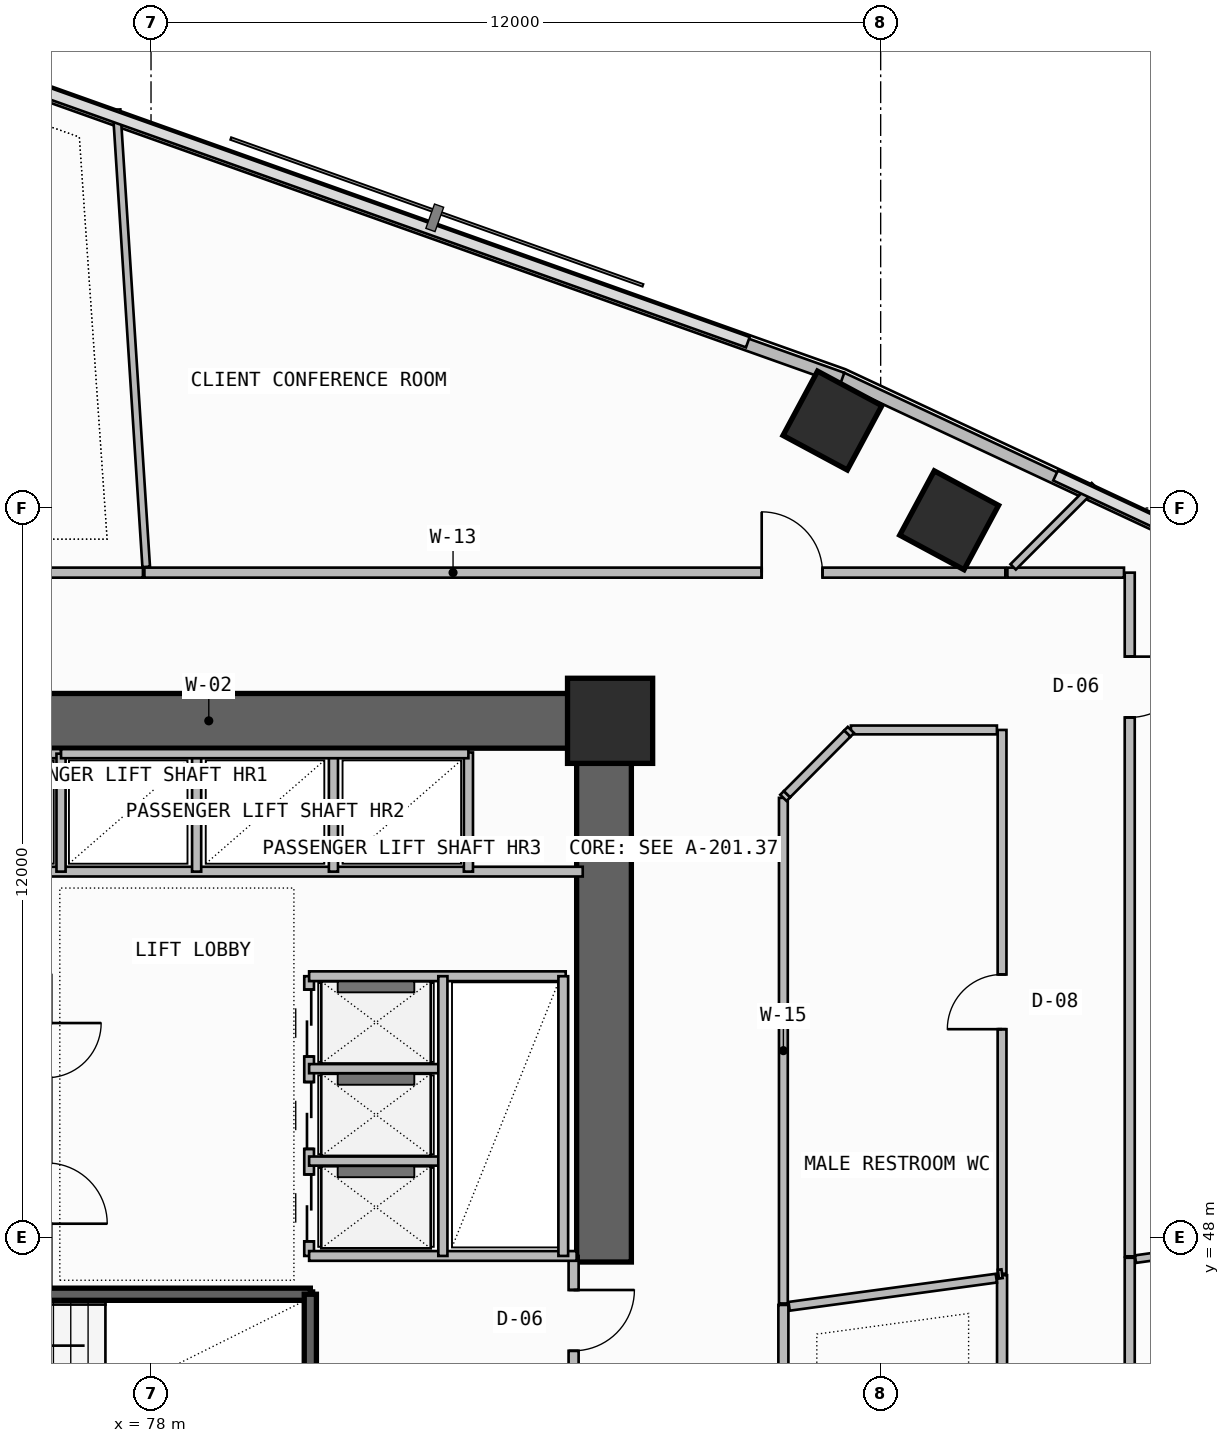
"""IFC4 building model, lengths in metres.
Left out: names, types, materials, properties, quantities, classifications, styles, units other than length and angle.
Written with IfcOpenShell. Run it as: python <this file> out.ifc"""

import sys

from ifc_helpers import new_model, si_unit, direction, frame, frame_2d, origin, origin_2d, place, context, subcontext, project, spatial, rectangle, extrude, element, fill, save


model = new_model("IFC4")
c1 = context("Model", 3, precision=1e-05, world=origin(), true_north=direction((0.0, 1.0)))
c2 = subcontext(c1, "Body", "Model", "MODEL_VIEW")
j1 = project(units=[si_unit("LENGTHUNIT", "METRE"), si_unit("PLANEANGLEUNIT", "RADIAN")], contexts=[c1])
p1 = place(None, origin())
s1 = spatial("IfcSite", under=j1, at=p1, CompositionType="ELEMENT")
p2 = place(p1, origin())
s2 = spatial("IfcBuilding", under=s1, at=p2, CompositionType="ELEMENT")
p3 = place(p2, frame((0.0, 0.0, 132.3)))
s3 = spatial("IfcBuildingStorey", under=s2, at=p3, CompositionType="ELEMENT", Elevation=132.3)
p4 = place(p3, frame((72.0, 56.5, -0.4), z_axis=(0.0, 0.0, 1.0), x_axis=(1.0, 0.0, 0.0)))
e1 = element("IfcWall", 1, at=p4, inside=s3, PredefinedType="SHEAR", context=c2, shape_type="SweptSolid", body=[
    extrude(rectangle(XDim=13.9, YDim=0.9, at=frame_2d((6.95, 0.0))), origin(), (0.0, 0.0, 1.0), 3.74),
])
p5 = place(p3, frame((85.45, 47.6, -0.4), z_axis=(0.0, 0.0, 1.0), x_axis=(0.0, 1.0, 0.0)))
e2 = element("IfcWall", 2, at=p5, inside=s3, PredefinedType="SHEAR", context=c2, shape_type="SweptSolid", body=[
    extrude(rectangle(XDim=8.45, YDim=0.9, at=frame_2d((4.225, 0.0))), origin(), (0.0, 0.0, 1.0), 3.74),
])
p6 = place(p3, frame((85.55, 56.5, 0.0), z_axis=(0.0, 0.0, 1.0), x_axis=(1.0, 0.0, 0.0)))
e3 = element("IfcColumn", 3, at=p6, inside=s3, PredefinedType="COLUMN", context=c2, shape_type="SweptSolid", body=[
    extrude(rectangle(XDim=1.4, YDim=1.4, at=origin_2d()), origin(), (0.0, 0.0, 1.0), 3.6),
])
p7 = place(p3, frame((91.126, 59.798, -0.4), z_axis=(0.0, 0.0, 1.0), x_axis=(0.473319667185, 0.880890738205, 0.0)))
e4 = element("IfcColumn", 4, at=p7, inside=s3, PredefinedType="COLUMN", context=c2, shape_type="SweptSolid", body=[
    extrude(rectangle(XDim=1.2, YDim=1.2, at=origin_2d()), origin(), (0.0, 0.0, 1.0), 4.0),
])
p8 = place(p3, frame((89.207, 61.438, 0.0), z_axis=(0.0, 0.0, 1.0), x_axis=(0.473319667185, 0.880890738205, 0.0)))
e5 = element("IfcColumn", 5, at=p8, inside=s3, PredefinedType="COLUMN", context=c2, shape_type="SweptSolid", body=[
    extrude(rectangle(XDim=1.2, YDim=1.2, at=origin_2d()), origin(), (0.0, 0.0, 1.0), 3.6),
])
p9 = place(p3, frame((119.926, 47.843, 0.0), z_axis=(0.0, 0.0, 1.0), x_axis=(-0.905880730846, 0.423532881228, 0.0)))
e6 = element("IfcWall", 6, at=p9, inside=s3, PredefinedType="PARAPET", context=c2, shape_type="SweptSolid", body=[
    extrude(rectangle(XDim=33.748, YDim=0.2, at=frame_2d((16.874, 0.0))), origin(), (0.0, 0.0, 1.0), 1.15),
])
p10 = place(p3, frame((89.368, 62.13, 0.0), z_axis=(0.0, 0.0, 1.0), x_axis=(-0.942033439765, 0.335518998515, 0.0)))
e7 = element("IfcWall", 7, at=p10, inside=s3, PredefinedType="PARAPET", context=c2, shape_type="SweptSolid", body=[
    extrude(rectangle(XDim=27.969, YDim=0.2, at=frame_2d((13.985, 0.0))), origin(), (0.0, 0.0, 1.0), 1.15),
])
p11 = place(p3, frame((72.92, 47.07, -0.4), z_axis=(0.0, 0.0, 1.0), x_axis=(1.0, 0.0, 0.0)))
e8 = element("IfcWall", 8, at=p11, inside=s3, PredefinedType="SOLIDWALL", context=c2, shape_type="SweptSolid", body=[
    extrude(rectangle(XDim=7.7, YDim=0.2, at=frame_2d((3.85, 0.0))), origin(), (0.0, 0.0, 1.0), 3.74),
])
p12 = place(p3, frame((80.62, 43.83, -0.4), z_axis=(0.0, 0.0, 1.0), x_axis=(0.0, 1.0, 0.0)))
e9 = element("IfcWall", 9, at=p12, inside=s3, PredefinedType="SOLIDWALL", context=c2, shape_type="SweptSolid", body=[
    extrude(rectangle(XDim=3.24, YDim=0.2, at=frame_2d((1.62, 0.0))), origin(), (0.0, 0.0, 1.0), 3.74),
])
p13 = place(p3, frame((84.95, 45.58, 0.0), z_axis=(0.0, 0.0, 1.0), x_axis=(0.0, 1.0, 0.0)))
e10 = element("IfcWall", 10, at=p13, inside=s3, PredefinedType="PARTITIONING", context=c2, shape_type="SweptSolid", body=[
    extrude(rectangle(XDim=2.12, YDim=0.165, at=frame_2d((1.06, 0.0))), origin(), (0.0, 0.0, 1.0), 3.34),
])
p14 = place(p13, frame((0.56, 0.0, 0.0)))
e11 = element("IfcOpeningElement", 11, at=p14, cuts=e10, PredefinedType="OPENING", context=c2, shape_type="SweptSolid", body=[
    extrude(rectangle(XDim=1.0, YDim=2.2, at=frame_2d((0.5, 1.1))), frame((0.0, 0.093, 0.0), z_axis=(0.0, -1.0, 0.0), x_axis=(1.0, 0.0, 0.0)), (0.0, 0.0, 1.0), 0.185),
])
p15 = place(p3, frame((80.6, 47.7, 0.0), z_axis=(0.0, 0.0, 1.0), x_axis=(0.0, 1.0, 0.0)))
e12 = element("IfcWall", 12, at=p15, inside=s3, PredefinedType="SOLIDWALL", context=c2, shape_type="SweptSolid", body=[
    extrude(rectangle(XDim=4.6, YDim=0.16, at=frame_2d((2.3, 0.0))), origin(), (0.0, 0.0, 1.0), 3.34),
])
p16 = place(p15, frame((0.24, 0.0, 0.0)))
e13 = element("IfcOpeningElement", 13, at=p16, cuts=e12, PredefinedType="OPENING", context=c2, shape_type="SweptSolid", body=[
    extrude(rectangle(XDim=1.1, YDim=2.25, at=frame_2d((0.55, 1.125))), frame((0.0, 0.09, 0.0), z_axis=(0.0, -1.0, 0.0), x_axis=(1.0, 0.0, 0.0)), (0.0, 0.0, 1.0), 0.18),
])
p17 = place(p15, frame((1.76, 0.0, 0.0)))
e14 = element("IfcOpeningElement", 14, at=p17, cuts=e12, PredefinedType="OPENING", context=c2, shape_type="SweptSolid", body=[
    extrude(rectangle(XDim=1.1, YDim=2.25, at=frame_2d((0.55, 1.125))), frame((0.0, 0.09, 0.0), z_axis=(0.0, -1.0, 0.0), x_axis=(1.0, 0.0, 0.0)), (0.0, 0.0, 1.0), 0.18),
])
p18 = place(p15, frame((3.28, 0.0, 0.0)))
e15 = element("IfcOpeningElement", 15, at=p18, cuts=e12, PredefinedType="OPENING", context=c2, shape_type="SweptSolid", body=[
    extrude(rectangle(XDim=1.1, YDim=2.25, at=frame_2d((0.55, 1.125))), frame((0.0, 0.09, 0.0), z_axis=(0.0, -1.0, 0.0), x_axis=(1.0, 0.0, 0.0)), (0.0, 0.0, 1.0), 0.18),
])
p19 = place(p3, frame((80.6, 47.7, 0.0), z_axis=(0.0, 0.0, 1.0), x_axis=(1.0, 0.0, 0.0)))
e16 = element("IfcWall", 16, at=p19, inside=s3, PredefinedType="SOLIDWALL", context=c2, shape_type="SweptSolid", body=[
    extrude(rectangle(XDim=4.4, YDim=0.16, at=frame_2d((2.2, 0.0))), origin(), (0.0, 0.0, 1.0), 3.34),
])
p20 = place(p3, frame((80.6, 52.3, 0.0), z_axis=(0.0, 0.0, 1.0), x_axis=(1.0, 0.0, 0.0)))
e17 = element("IfcWall", 17, at=p20, inside=s3, PredefinedType="SOLIDWALL", context=c2, shape_type="SweptSolid", body=[
    extrude(rectangle(XDim=4.22, YDim=0.16, at=frame_2d((2.11, 0.0))), origin(), (0.0, 0.0, 1.0), 3.34),
])
for number, where, z_axis, x_axis in (
    (18, (80.6, 49.26, 0.0), (0.0, 0.0, 1.0), (1.0, 0.0, 0.0)),
    (19, (80.6, 50.78, 0.0), (0.0, 0.0, 1.0), (1.0, 0.0, 0.0)),
):
    element("IfcWall", number, at=place(p3, frame(where, z_axis=z_axis, x_axis=x_axis)), inside=s3, PredefinedType="PLUMBINGWALL", context=c2, shape_type="SweptSolid", body=[
        extrude(rectangle(XDim=2.2, YDim=0.15, at=frame_2d((1.1, 0.0))), origin(), (0.0, 0.0, 1.0), 3.34),
    ])
p21 = place(p3, frame((82.8, 47.7, 0.0), z_axis=(0.0, 0.0, 1.0), x_axis=(0.0, 1.0, 0.0)))
e20 = element("IfcWall", 20, at=p21, inside=s3, PredefinedType="PLUMBINGWALL", context=c2, shape_type="SweptSolid", body=[
    extrude(rectangle(XDim=4.6, YDim=0.15, at=frame_2d((2.3, 0.0))), origin(), (0.0, 0.0, 1.0), 3.34),
])
p22 = place(p3, frame((84.78, 47.7, 0.0), z_axis=(0.0, 0.0, 1.0), x_axis=(0.0, 1.0, 0.0)))
e21 = element("IfcWall", 21, at=p22, inside=s3, PredefinedType="SOLIDWALL", context=c2, shape_type="SweptSolid", body=[
    extrude(rectangle(XDim=4.6, YDim=0.16, at=frame_2d((2.3, 0.0))), origin(), (0.0, 0.0, 1.0), 3.34),
])
p23 = place(p3, frame((73.02, 54.02, 0.0), z_axis=(0.0, 0.0, 1.0), x_axis=(1.0, 0.0, 0.0)))
e22 = element("IfcWall", 22, at=p23, inside=s3, PredefinedType="SOLIDWALL", context=c2, shape_type="SweptSolid", body=[
    extrude(rectangle(XDim=12.08, YDim=0.16, at=frame_2d((6.04, 0.0))), origin(), (0.0, 0.0, 1.0), 3.34),
])
p24 = place(p3, frame((73.02, 55.96, 0.0), z_axis=(0.0, 0.0, 1.0), x_axis=(1.0, 0.0, 0.0)))
e23 = element("IfcWall", 23, at=p24, inside=s3, PredefinedType="SOLIDWALL", context=c2, shape_type="SweptSolid", body=[
    extrude(rectangle(XDim=3.5, YDim=0.15, at=frame_2d((1.75, 0.0))), origin(), (0.0, 0.0, 1.0), 3.34),
])
p25 = place(p3, frame((76.52, 54.02, 0.0), z_axis=(0.0, 0.0, 1.0), x_axis=(0.0, 1.0, 0.0)))
e24 = element("IfcWall", 24, at=p25, inside=s3, PredefinedType="SOLIDWALL", context=c2, shape_type="SweptSolid", body=[
    extrude(rectangle(XDim=1.94, YDim=0.15, at=frame_2d((0.97, 0.0))), origin(), (0.0, 0.0, 1.0), 3.34),
])
for number, where, z_axis, x_axis in (
    (25, (78.75, 54.02, 0.0), (0.0, 0.0, 1.0), (0.0, 1.0, 0.0)),
    (26, (81.0, 54.02, 0.0), (0.0, 0.0, 1.0), (0.0, 1.0, 0.0)),
):
    element("IfcWall", number, at=place(p3, frame(where, z_axis=z_axis, x_axis=x_axis)), inside=s3, PredefinedType="PLUMBINGWALL", context=c2, shape_type="SweptSolid", body=[
        extrude(rectangle(XDim=1.96, YDim=0.15, at=frame_2d((0.98, 0.0))), origin(), (0.0, 0.0, 1.0), 3.34),
    ])
p26 = place(p3, frame((83.22, 54.02, 0.0), z_axis=(0.0, 0.0, 1.0), x_axis=(0.0, 1.0, 0.0)))
e27 = element("IfcWall", 27, at=p26, inside=s3, PredefinedType="SOLIDWALL", context=c2, shape_type="SweptSolid", body=[
    extrude(rectangle(XDim=1.96, YDim=0.15, at=frame_2d((0.98, 0.0))), origin(), (0.0, 0.0, 1.0), 3.34),
])
p27 = place(p3, frame((76.52, 55.96, 0.0), z_axis=(0.0, 0.0, 1.0), x_axis=(1.0, 0.0, 0.0)))
e28 = element("IfcWall", 28, at=p27, inside=s3, PredefinedType="SOLIDWALL", context=c2, shape_type="SweptSolid", body=[
    extrude(rectangle(XDim=6.7, YDim=0.15, at=frame_2d((3.35, 0.0))), origin(), (0.0, 0.0, 1.0), 3.34),
])
p28 = place(p3, frame((88.4, 37.256, 0.0), z_axis=(0.0, 0.0, 1.0), x_axis=(0.0, 1.0, 0.0)))
e29 = element("IfcWall", 29, at=p28, inside=s3, PredefinedType="PARTITIONING", context=c2, shape_type="SweptSolid", body=[
    extrude(rectangle(XDim=9.638, YDim=0.165, at=frame_2d((4.819, 0.0))), origin(), (0.0, 0.0, 1.0), 2.725),
])
p29 = place(p28, frame((3.083, 0.0, 0.0)))
e30 = element("IfcOpeningElement", 30, at=p29, cuts=e29, PredefinedType="OPENING", context=c2, shape_type="SweptSolid", body=[
    extrude(rectangle(XDim=1.0, YDim=2.2, at=frame_2d((0.5, 1.1))), frame((0.0, 0.093, 0.0), z_axis=(0.0, -1.0, 0.0), x_axis=(1.0, 0.0, 0.0)), (0.0, 0.0, 1.0), 0.185),
])
p30 = place(p3, frame((91.996, 47.384, 0.0), z_axis=(0.0, 0.0, 1.0), x_axis=(0.0, -1.0, 0.0)))
e31 = element("IfcWall", 31, at=p30, inside=s3, PredefinedType="PARTITIONING", context=c2, shape_type="SweptSolid", body=[
    extrude(rectangle(XDim=9.244, YDim=0.165, at=frame_2d((4.622, 0.0))), origin(), (0.0, 0.0, 1.0), 2.725),
])
p31 = place(p3, frame((94.096, 38.771, 0.0), z_axis=(0.0, 0.0, 1.0), x_axis=(0.0, 1.0, 0.0)))
e32 = element("IfcWall", 32, at=p31, inside=s3, PredefinedType="PARTITIONING", context=c2, shape_type="SweptSolid", body=[
    extrude(rectangle(XDim=8.898, YDim=0.165, at=frame_2d((4.449, 0.0))), origin(), (0.0, 0.0, 1.0), 2.725),
])
p32 = place(p3, frame((94.191, 47.647, 0.0), z_axis=(0.0, 0.0, 1.0), x_axis=(0.99024252498, 0.139354733403, 0.0)))
e33 = element("IfcWall", 33, at=p32, inside=s3, PredefinedType="PARTITIONING", context=c2, shape_type="SweptSolid", body=[
    extrude(rectangle(XDim=20.594, YDim=0.125, at=frame_2d((10.297, 0.0))), origin(), (0.0, 0.0, 1.0), 2.725),
])
p33 = place(p3, frame((88.494, 46.872, 0.0), z_axis=(0.0, 0.0, 1.0), x_axis=(0.990889260198, 0.134679152153, 0.0)))
e34 = element("IfcWall", 34, at=p33, inside=s3, PredefinedType="PARTITIONING", context=c2, shape_type="SweptSolid", body=[
    extrude(rectangle(XDim=3.439, YDim=0.145, at=frame_2d((1.719, 0.0))), origin(), (0.0, 0.0, 1.0), 2.925),
])
p34 = place(p3, frame((94.096, 47.694, 0.0), z_axis=(0.0, 0.0, 1.0), x_axis=(0.0, 1.0, 0.0)))
e35 = element("IfcWall", 35, at=p34, inside=s3, PredefinedType="PARTITIONING", context=c2, shape_type="SweptSolid", body=[
    extrude(rectangle(XDim=11.243, YDim=0.165, at=frame_2d((5.622, 0.0))), origin(), (0.0, 0.0, 1.0), 2.725),
])
p35 = place(p34, frame((8.862, 0.0, 0.0)))
e36 = element("IfcOpeningElement", 36, at=p35, cuts=e35, PredefinedType="OPENING", context=c2, shape_type="SweptSolid", body=[
    extrude(rectangle(XDim=1.0, YDim=2.2, at=frame_2d((0.5, 1.1))), frame((0.0, 0.093, 0.0), z_axis=(0.0, -1.0, 0.0), x_axis=(1.0, 0.0, 0.0)), (0.0, 0.0, 1.0), 0.185),
])
p36 = place(p3, frame((94.002, 58.937, 0.0), z_axis=(0.0, 0.0, 1.0), x_axis=(-1.0, 0.0, 0.0)))
e37 = element("IfcWall", 37, at=p36, inside=s3, PredefinedType="PARTITIONING", context=c2, shape_type="SweptSolid", body=[
    extrude(rectangle(XDim=1.917, YDim=0.165, at=frame_2d((0.959, 0.0))), origin(), (0.0, 0.0, 1.0), 2.725),
])
p37 = place(p3, frame((92.179, 59.031, 0.0), z_axis=(0.0, 0.0, 1.0), x_axis=(0.707106781187, 0.707106781187, 0.0)))
e38 = element("IfcWall", 38, at=p37, inside=s3, PredefinedType="PARTITIONING", context=c2, shape_type="SweptSolid", body=[
    extrude(rectangle(XDim=1.89, YDim=0.125, at=frame_2d((0.945, 0.0))), origin(), (0.0, 0.0, 1.0), 2.725),
])
p38 = place(p3, frame((91.996, 56.35, 0.0), z_axis=(0.0, 0.0, 1.0), x_axis=(0.0, -1.0, 0.0)))
e39 = element("IfcWall", 39, at=p38, inside=s3, PredefinedType="PARTITIONING", context=c2, shape_type="SweptSolid", body=[
    extrude(rectangle(XDim=8.942, YDim=0.145, at=frame_2d((4.471, 0.0))), origin(), (0.0, 0.0, 1.0), 2.725),
])
p39 = place(p38, frame((4.021, 0.0, 0.0)))
e40 = element("IfcOpeningElement", 40, at=p39, cuts=e39, PredefinedType="OPENING", context=c2, shape_type="SweptSolid", body=[
    extrude(rectangle(XDim=0.9, YDim=2.1, at=frame_2d((0.45, 1.05))), frame((0.0, 0.083, 0.0), z_axis=(0.0, -1.0, 0.0), x_axis=(1.0, 0.0, 0.0)), (0.0, 0.0, 1.0), 0.165),
])
p40 = place(p3, frame((88.4, 46.919, 0.0), z_axis=(0.0, 0.0, 1.0), x_axis=(0.0, 1.0, 0.0)))
e41 = element("IfcWall", 41, at=p40, inside=s3, PredefinedType="PARTITIONING", context=c2, shape_type="SweptSolid", body=[
    extrude(rectangle(XDim=8.315, YDim=0.145, at=frame_2d((4.157, 0.0))), origin(), (0.0, 0.0, 1.0), 3.34),
])
p41 = place(p3, frame((89.511, 56.35, 0.0), z_axis=(0.0, 0.0, 1.0), x_axis=(1.0, 0.0, 0.0)))
e42 = element("IfcWall", 42, at=p41, inside=s3, PredefinedType="PARTITIONING", context=c2, shape_type="SweptSolid", body=[
    extrude(rectangle(XDim=2.401, YDim=0.145, at=frame_2d((1.201, 0.0))), origin(), (0.0, 0.0, 1.0), 2.925),
])
p42 = place(p3, frame((88.4, 55.233, 0.0), z_axis=(0.0, 0.0, 1.0), x_axis=(0.705671035809, 0.708539617255, 0.0)))
e43 = element("IfcWall", 43, at=p42, inside=s3, PredefinedType="PARTITIONING", context=c2, shape_type="SweptSolid", body=[
    extrude(rectangle(XDim=0.085, YDim=0.145, at=frame_2d((0.042, 0.0))), origin(), (0.0, 0.0, 1.0), 3.34),
])
p43 = place(p3, frame((89.451, 56.29, 0.0), z_axis=(0.0, 0.0, 1.0), x_axis=(0.704214765071, 0.709987017244, 0.0)))
e44 = element("IfcWall", 44, at=p43, inside=s3, PredefinedType="PARTITIONING", context=c2, shape_type="SweptSolid", body=[
    extrude(rectangle(XDim=0.084, YDim=0.145, at=frame_2d((0.042, 0.0))), origin(), (0.0, 0.0, 1.0), 2.925),
])
p44 = place(p3, frame((91.996, 47.408, 0.0), z_axis=(0.0, 0.0, 1.0), x_axis=(-0.991122022459, -0.132955393257, 0.0)))
e45 = element("IfcWall", 45, at=p44, inside=s3, PredefinedType="PARTITIONING", context=c2, shape_type="SweptSolid", body=[
    extrude(rectangle(XDim=0.061, YDim=0.145, at=frame_2d((0.03, 0.0))), origin(), (0.0, 0.0, 1.0), 3.34),
])
p45 = place(p3, frame((92.05, 58.937, 0.0), z_axis=(0.0, 0.0, 1.0), x_axis=(-1.0, 0.0, 0.0)))
e46 = element("IfcWall", 46, at=p45, inside=s3, PredefinedType="PARTITIONING", context=c2, shape_type="SweptSolid", body=[
    extrude(rectangle(XDim=14.159, YDim=0.165, at=frame_2d((7.08, 0.0))), origin(), (0.0, 0.0, 1.0), 2.725),
])
p46 = place(p45, frame((3.007, 0.0, 0.0)))
e47 = element("IfcOpeningElement", 47, at=p46, cuts=e46, PredefinedType="OPENING", context=c2, shape_type="SweptSolid", body=[
    extrude(rectangle(XDim=1.0, YDim=2.2, at=frame_2d((0.5, 1.1))), frame((0.0, 0.093, 0.0), z_axis=(0.0, -1.0, 0.0), x_axis=(1.0, 0.0, 0.0)), (0.0, 0.0, 1.0), 0.185),
])
p47 = place(p3, frame((77.921, 59.031, 0.0), z_axis=(0.0, 0.0, 1.0), x_axis=(-0.064701804288, 0.997904643, 0.0)))
e48 = element("IfcWall", 48, at=p47, inside=s3, PredefinedType="PARTITIONING", context=c2, shape_type="SweptSolid", body=[
    extrude(rectangle(XDim=7.535, YDim=0.125, at=frame_2d((3.768, 0.0))), origin(), (0.0, 0.0, 1.0), 3.34),
])
p48 = place(p3, frame((77.867, 58.937, 0.0), z_axis=(0.0, 0.0, 1.0), x_axis=(-1.0, 0.0, 0.0)))
e49 = element("IfcWall", 49, at=p48, inside=s3, PredefinedType="PARTITIONING", context=c2, shape_type="SweptSolid", body=[
    extrude(rectangle(XDim=8.513, YDim=0.165, at=frame_2d((4.257, 0.0))), origin(), (0.0, 0.0, 1.0), 2.725),
])
p49 = place(p48, frame((2.69, 0.0, 0.0)))
e50 = element("IfcOpeningElement", 50, at=p49, cuts=e49, PredefinedType="OPENING", context=c2, shape_type="SweptSolid", body=[
    extrude(rectangle(XDim=1.0, YDim=2.2, at=frame_2d((0.5, 1.1))), frame((0.0, 0.093, 0.0), z_axis=(0.0, -1.0, 0.0), x_axis=(1.0, 0.0, 0.0)), (0.0, 0.0, 1.0), 0.185),
])
p50 = place(p3, frame((88.46, 55.294, 0.0), z_axis=(0.0, 0.0, 1.0), x_axis=(0.705280427547, 0.708928429758, 0.0)))
e51 = element("IfcWall", 51, at=p50, inside=s3, PredefinedType="PARTITIONING", context=c2, shape_type="SweptSolid", body=[
    extrude(rectangle(XDim=1.406, YDim=0.145, at=frame_2d((0.703, 0.0))), origin(), (0.0, 0.0, 1.0), 2.725),
])
p51 = place(p14, frame((1.0, 0.0, 0.0), z_axis=(0.0, 0.0, 1.0), x_axis=(-1.0, 0.0, 0.0)))
e52 = element("IfcDoor", 52, at=p51, inside=s3, OperationType="SINGLE_SWING_LEFT", PredefinedType="DOOR", context=c2, shape_type="SweptSolid", body=[
    extrude(rectangle(XDim=1.0, YDim=2.2, at=frame_2d((0.5, 1.1))), frame((0.0, 0.025, 0.0), z_axis=(0.0, -1.0, 0.0), x_axis=(1.0, 0.0, 0.0)), (0.0, 0.0, 1.0), 0.05),
])
fill(e11, e52)
p52 = place(p16, frame((1.1, 0.0, 0.0), z_axis=(0.0, 0.0, 1.0), x_axis=(-1.0, 0.0, 0.0)))
e53 = element("IfcDoor", 53, at=p52, inside=s3, OperationType="DOUBLE_DOOR_SLIDING", PredefinedType="DOOR", context=c2, shape_type="SweptSolid", body=[
    extrude(rectangle(XDim=1.1, YDim=2.25, at=frame_2d((0.55, 1.125))), frame((0.0, 0.025, 0.0), z_axis=(0.0, -1.0, 0.0), x_axis=(1.0, 0.0, 0.0)), (0.0, 0.0, 1.0), 0.05),
])
fill(e13, e53)
p53 = place(p17, frame((1.1, 0.0, 0.0), z_axis=(0.0, 0.0, 1.0), x_axis=(-1.0, 0.0, 0.0)))
e54 = element("IfcDoor", 54, at=p53, inside=s3, OperationType="DOUBLE_DOOR_SLIDING", PredefinedType="DOOR", context=c2, shape_type="SweptSolid", body=[
    extrude(rectangle(XDim=1.1, YDim=2.25, at=frame_2d((0.55, 1.125))), frame((0.0, 0.025, 0.0), z_axis=(0.0, -1.0, 0.0), x_axis=(1.0, 0.0, 0.0)), (0.0, 0.0, 1.0), 0.05),
])
fill(e14, e54)
p54 = place(p18, frame((1.1, 0.0, 0.0), z_axis=(0.0, 0.0, 1.0), x_axis=(-1.0, 0.0, 0.0)))
e55 = element("IfcDoor", 55, at=p54, inside=s3, OperationType="DOUBLE_DOOR_SLIDING", PredefinedType="DOOR", context=c2, shape_type="SweptSolid", body=[
    extrude(rectangle(XDim=1.1, YDim=2.25, at=frame_2d((0.55, 1.125))), frame((0.0, 0.025, 0.0), z_axis=(0.0, -1.0, 0.0), x_axis=(1.0, 0.0, 0.0)), (0.0, 0.0, 1.0), 0.05),
])
fill(e15, e55)
p55 = place(p35, frame((1.0, 0.0, 0.0), z_axis=(0.0, 0.0, 1.0), x_axis=(-1.0, 0.0, 0.0)))
e56 = element("IfcDoor", 56, at=p55, inside=s3, OperationType="SINGLE_SWING_LEFT", PredefinedType="DOOR", context=c2, shape_type="SweptSolid", body=[
    extrude(rectangle(XDim=1.0, YDim=2.2, at=frame_2d((0.5, 1.1))), frame((0.0, 0.025, 0.0), z_axis=(0.0, -1.0, 0.0), x_axis=(1.0, 0.0, 0.0)), (0.0, 0.0, 1.0), 0.05),
])
fill(e36, e56)
p56 = place(p39, frame((0.9, 0.0, 0.0), z_axis=(0.0, 0.0, 1.0), x_axis=(-1.0, 0.0, 0.0)))
e57 = element("IfcDoor", 57, at=p56, inside=s3, OperationType="SINGLE_SWING_LEFT", PredefinedType="DOOR", context=c2, shape_type="SweptSolid", body=[
    extrude(rectangle(XDim=0.9, YDim=2.1, at=frame_2d((0.45, 1.05))), frame((0.0, 0.025, 0.0), z_axis=(0.0, -1.0, 0.0), x_axis=(1.0, 0.0, 0.0)), (0.0, 0.0, 1.0), 0.05),
])
fill(e40, e57)
p57 = place(p46, frame((1.0, 0.0, 0.0), z_axis=(0.0, 0.0, 1.0), x_axis=(-1.0, 0.0, 0.0)))
e58 = element("IfcDoor", 58, at=p57, inside=s3, OperationType="SINGLE_SWING_LEFT", PredefinedType="DOOR", context=c2, shape_type="SweptSolid", body=[
    extrude(rectangle(XDim=1.0, YDim=2.2, at=frame_2d((0.5, 1.1))), frame((0.0, 0.025, 0.0), z_axis=(0.0, -1.0, 0.0), x_axis=(1.0, 0.0, 0.0)), (0.0, 0.0, 1.0), 0.05),
])
fill(e47, e58)
save(model, sys.argv[1])
